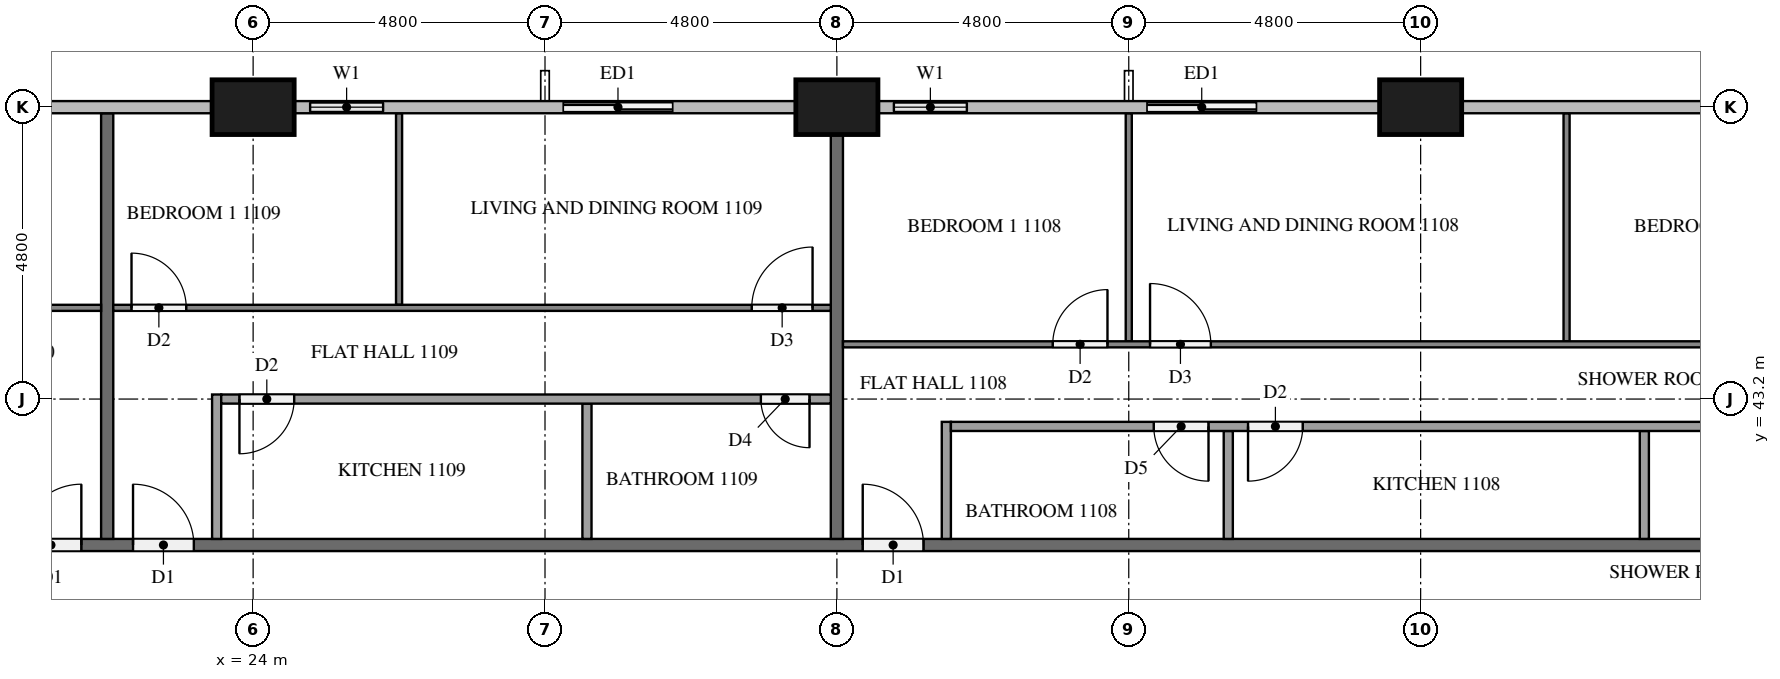
"""IFC4 building model, lengths in metres.
Left out: names, types, materials, properties, quantities, classifications, styles, units other than length and angle.
Written with IfcOpenShell. Run it as: python <this file> out.ifc"""

import sys

from ifc_helpers import new_model, si_unit, direction, frame, frame_2d, origin, origin_2d, place, context, subcontext, project, spatial, rectangle, extrude, element, fill, save


model = new_model("IFC4")
c1 = context("Model", 3, precision=1e-05, world=origin(), true_north=direction((0.0, 1.0)))
c2 = subcontext(c1, "Body", "Model", "MODEL_VIEW")
j1 = project(units=[si_unit("LENGTHUNIT", "METRE"), si_unit("PLANEANGLEUNIT", "RADIAN")], contexts=[c1])
p1 = place(None, origin())
s1 = spatial("IfcSite", under=j1, at=p1, CompositionType="ELEMENT")
p2 = place(p1, origin())
s2 = spatial("IfcBuilding", under=s1, at=p2, CompositionType="ELEMENT")
p3 = place(p2, frame((0.0, 0.0, 46.9)))
s3 = spatial("IfcBuildingStorey", under=s2, at=p3, CompositionType="ELEMENT", Elevation=46.9)
for number, where, z_axis, x_axis in (
    (1, (43.2, 48.0, 0.0), (0.0, 0.0, 1.0), (1.0, 0.0, 0.0)),
    (2, (33.6, 48.0, 0.0), (0.0, 0.0, 1.0), (1.0, 0.0, 0.0)),
    (3, (24.0, 48.0, 0.0), (0.0, 0.0, 1.0), (1.0, 0.0, 0.0)),
):
    element("IfcColumn", number, at=place(p3, frame(where, z_axis=z_axis, x_axis=x_axis)), inside=s3, PredefinedType="COLUMN", context=c2, shape_type="SweptSolid", body=[
        extrude(rectangle(XDim=1.35, YDim=0.9, at=origin_2d()), origin(), (0.0, 0.0, 1.0), 3.2),
    ])
p4 = place(p3, frame((40.8, 48.0, 0.0), z_axis=(0.0, 0.0, 1.0), x_axis=(-1.0, 0.0, 0.0)))
e4 = element("IfcWall", 4, at=p4, inside=s3, PredefinedType="SOLIDWALL", context=c2, shape_type="SweptSolid", body=[
    extrude(rectangle(XDim=2.4, YDim=0.15, at=frame_2d((1.2, 0.0))), origin(), (0.0, 0.0, 1.0), 3.2),
])
p5 = place(p4, frame((0.3, 0.0, 0.0)))
e5 = element("IfcOpeningElement", 5, at=p5, cuts=e4, PredefinedType="OPENING", context=c2, shape_type="SweptSolid", body=[
    extrude(rectangle(XDim=1.8, YDim=2.4, at=frame_2d((0.9, 1.2))), frame((0.0, 0.085, 0.0), z_axis=(0.0, -1.0, 0.0), x_axis=(1.0, 0.0, 0.0)), (0.0, 0.0, 1.0), 0.17),
])
p6 = place(p3, frame((36.0, 48.0, 0.0), z_axis=(0.0, 0.0, 1.0), x_axis=(-1.0, 0.0, 0.0)))
e6 = element("IfcWall", 6, at=p6, inside=s3, PredefinedType="SOLIDWALL", context=c2, shape_type="SweptSolid", body=[
    extrude(rectangle(XDim=1.725, YDim=0.15, at=frame_2d((0.863, 0.0))), origin(), (0.0, 0.0, 1.0), 3.2),
])
p7 = place(p6, frame((0.262, 0.0, 0.9)))
e7 = element("IfcOpeningElement", 7, at=p7, cuts=e6, PredefinedType="OPENING", context=c2, shape_type="SweptSolid", body=[
    extrude(rectangle(XDim=1.2, YDim=1.4, at=frame_2d((0.6, 0.7))), frame((0.0, 0.085, 0.0), z_axis=(0.0, -1.0, 0.0), x_axis=(1.0, 0.0, 0.0)), (0.0, 0.0, 1.0), 0.17),
])
p8 = place(p3, frame((31.2, 48.0, 0.0), z_axis=(0.0, 0.0, 1.0), x_axis=(-1.0, 0.0, 0.0)))
e8 = element("IfcWall", 8, at=p8, inside=s3, PredefinedType="SOLIDWALL", context=c2, shape_type="SweptSolid", body=[
    extrude(rectangle(XDim=2.4, YDim=0.15, at=frame_2d((1.2, 0.0))), origin(), (0.0, 0.0, 1.0), 3.2),
])
p9 = place(p8, frame((0.3, 0.0, 0.0)))
e9 = element("IfcOpeningElement", 9, at=p9, cuts=e8, PredefinedType="OPENING", context=c2, shape_type="SweptSolid", body=[
    extrude(rectangle(XDim=1.8, YDim=2.4, at=frame_2d((0.9, 1.2))), frame((0.0, 0.085, 0.0), z_axis=(0.0, -1.0, 0.0), x_axis=(1.0, 0.0, 0.0)), (0.0, 0.0, 1.0), 0.17),
])
p10 = place(p3, frame((26.4, 48.0, 0.0), z_axis=(0.0, 0.0, 1.0), x_axis=(-1.0, 0.0, 0.0)))
e10 = element("IfcWall", 10, at=p10, inside=s3, PredefinedType="SOLIDWALL", context=c2, shape_type="SweptSolid", body=[
    extrude(rectangle(XDim=1.725, YDim=0.15, at=frame_2d((0.862, 0.0))), origin(), (0.0, 0.0, 1.0), 3.2),
])
p11 = place(p10, frame((0.262, 0.0, 0.9)))
e11 = element("IfcOpeningElement", 11, at=p11, cuts=e10, PredefinedType="OPENING", context=c2, shape_type="SweptSolid", body=[
    extrude(rectangle(XDim=1.2, YDim=1.4, at=frame_2d((0.6, 0.7))), frame((0.0, 0.085, 0.0), z_axis=(0.0, -1.0, 0.0), x_axis=(1.0, 0.0, 0.0)), (0.0, 0.0, 1.0), 0.17),
])
p12 = place(p3, frame((11.9, 40.8, 0.0), z_axis=(0.0, 0.0, 1.0), x_axis=(1.0, 0.0, 0.0)))
e12 = element("IfcWall", 12, at=p12, inside=s3, PredefinedType="PARTITIONING", context=c2, shape_type="SweptSolid", body=[
    extrude(rectangle(XDim=38.6, YDim=0.2, at=frame_2d((19.3, 0.0))), origin(), (0.0, 0.0, 1.0), 3.2),
])
p13 = place(p12, frame((22.125, 0.0, 0.0)))
e13 = element("IfcOpeningElement", 13, at=p13, cuts=e12, PredefinedType="OPENING", context=c2, shape_type="SweptSolid", body=[
    extrude(rectangle(XDim=1.0, YDim=2.1, at=frame_2d((0.5, 1.05))), frame((0.0, 0.11, 0.0), z_axis=(0.0, -1.0, 0.0), x_axis=(1.0, 0.0, 0.0)), (0.0, 0.0, 1.0), 0.22),
])
p14 = place(p12, frame((10.125, 0.0, 0.0)))
e14 = element("IfcOpeningElement", 14, at=p14, cuts=e12, PredefinedType="OPENING", context=c2, shape_type="SweptSolid", body=[
    extrude(rectangle(XDim=1.0, YDim=2.1, at=frame_2d((0.5, 1.05))), frame((0.0, 0.11, 0.0), z_axis=(0.0, -1.0, 0.0), x_axis=(1.0, 0.0, 0.0)), (0.0, 0.0, 1.0), 0.22),
])
p15 = place(p12, frame((8.275, 0.0, 0.0)))
e15 = element("IfcOpeningElement", 15, at=p15, cuts=e12, PredefinedType="OPENING", context=c2, shape_type="SweptSolid", body=[
    extrude(rectangle(XDim=1.0, YDim=2.1, at=frame_2d((0.5, 1.05))), frame((0.0, 0.11, 0.0), z_axis=(0.0, -1.0, 0.0), x_axis=(1.0, 0.0, 0.0)), (0.0, 0.0, 1.0), 0.22),
])
p16 = place(p3, frame((33.6, 47.55, 0.0), z_axis=(0.0, 0.0, 1.0), x_axis=(0.0, -1.0, 0.0)))
e16 = element("IfcWall", 16, at=p16, inside=s3, PredefinedType="PARTITIONING", context=c2, shape_type="SweptSolid", body=[
    extrude(rectangle(XDim=6.65, YDim=0.2, at=frame_2d((3.325, 0.0))), origin(), (0.0, 0.0, 1.0), 3.2),
])
p17 = place(p3, frame((21.6, 47.9, 0.0), z_axis=(0.0, 0.0, 1.0), x_axis=(0.0, -1.0, 0.0)))
e17 = element("IfcWall", 17, at=p17, inside=s3, PredefinedType="PARTITIONING", context=c2, shape_type="SweptSolid", body=[
    extrude(rectangle(XDim=7.0, YDim=0.2, at=frame_2d((3.5, 0.0))), origin(), (0.0, 0.0, 1.0), 3.2),
])
for number, where, z_axis, x_axis in (
    (18, (38.4, 44.15, 0.0), (0.0, 0.0, 1.0), (0.0, 1.0, 0.0)),
    (19, (45.6, 44.15, 0.0), (0.0, 0.0, 1.0), (0.0, 1.0, 0.0)),
):
    element("IfcWall", number, at=place(p3, frame(where, z_axis=z_axis, x_axis=x_axis)), inside=s3, PredefinedType="PARTITIONING", context=c2, shape_type="SweptSolid", body=[
        extrude(rectangle(XDim=3.75, YDim=0.1, at=frame_2d((1.875, 0.0))), origin(), (0.0, 0.0, 1.0), 3.2),
    ])
p18 = place(p3, frame((33.7, 44.1, 0.0), z_axis=(0.0, 0.0, 1.0), x_axis=(1.0, 0.0, 0.0)))
e20 = element("IfcWall", 20, at=p18, inside=s3, PredefinedType="PARTITIONING", context=c2, shape_type="SweptSolid", body=[
    extrude(rectangle(XDim=16.6, YDim=0.1, at=frame_2d((8.3, 0.0))), origin(), (0.0, 0.0, 1.0), 3.2),
])
p19 = place(p18, frame((3.45, 0.0, 0.0)))
e21 = element("IfcOpeningElement", 21, at=p19, cuts=e20, PredefinedType="OPENING", context=c2, shape_type="SweptSolid", body=[
    extrude(rectangle(XDim=0.9, YDim=2.1, at=frame_2d((0.45, 1.05))), frame((0.0, 0.06, 0.0), z_axis=(0.0, -1.0, 0.0), x_axis=(1.0, 0.0, 0.0)), (0.0, 0.0, 1.0), 0.12),
])
p20 = place(p18, frame((5.05, 0.0, 0.0)))
e22 = element("IfcOpeningElement", 22, at=p20, cuts=e20, PredefinedType="OPENING", context=c2, shape_type="SweptSolid", body=[
    extrude(rectangle(XDim=1.0, YDim=2.1, at=frame_2d((0.5, 1.05))), frame((0.0, 0.06, 0.0), z_axis=(0.0, -1.0, 0.0), x_axis=(1.0, 0.0, 0.0)), (0.0, 0.0, 1.0), 0.12),
])
p21 = place(p18, frame((15.4, 0.0, 0.0)))
e23 = element("IfcOpeningElement", 23, at=p21, cuts=e20, PredefinedType="OPENING", context=c2, shape_type="SweptSolid", body=[
    extrude(rectangle(XDim=0.9, YDim=2.1, at=frame_2d((0.45, 1.05))), frame((0.0, 0.06, 0.0), z_axis=(0.0, -1.0, 0.0), x_axis=(1.0, 0.0, 0.0)), (0.0, 0.0, 1.0), 0.12),
])
for number, where, z_axis, x_axis in (
    (24, (40.037, 40.9, 0.0), (0.0, 0.0, 1.0), (0.0, 1.0, 0.0)),
    (25, (46.879, 40.9, 0.0), (0.0, 0.0, 1.0), (0.0, 1.0, 0.0)),
):
    element("IfcWall", number, at=place(p3, frame(where, z_axis=z_axis, x_axis=x_axis)), inside=s3, PredefinedType="PARTITIONING", context=c2, shape_type="SweptSolid", body=[
        extrude(rectangle(XDim=1.775, YDim=0.15, at=frame_2d((0.888, 0.0))), origin(), (0.0, 0.0, 1.0), 3.2),
    ])
p22 = place(p3, frame((35.4, 40.9, 0.0), z_axis=(0.0, 0.0, 1.0), x_axis=(0.0, 1.0, 0.0)))
e26 = element("IfcWall", 26, at=p22, inside=s3, PredefinedType="PARTITIONING", context=c2, shape_type="SweptSolid", body=[
    extrude(rectangle(XDim=1.925, YDim=0.15, at=frame_2d((0.962, 0.0))), origin(), (0.0, 0.0, 1.0), 3.2),
])
p23 = place(p3, frame((50.3, 42.75, 0.0), z_axis=(0.0, 0.0, 1.0), x_axis=(-1.0, 0.0, 0.0)))
e27 = element("IfcWall", 27, at=p23, inside=s3, PredefinedType="PARTITIONING", context=c2, shape_type="SweptSolid", body=[
    extrude(rectangle(XDim=14.825, YDim=0.15, at=frame_2d((7.413, 0.0))), origin(), (0.0, 0.0, 1.0), 3.2),
])
p24 = place(p23, frame((10.588, 0.0, 0.0)))
e28 = element("IfcOpeningElement", 28, at=p24, cuts=e27, PredefinedType="OPENING", context=c2, shape_type="SweptSolid", body=[
    extrude(rectangle(XDim=0.9, YDim=2.1, at=frame_2d((0.45, 1.05))), frame((0.0, 0.085, 0.0), z_axis=(0.0, -1.0, 0.0), x_axis=(1.0, 0.0, 0.0)), (0.0, 0.0, 1.0), 0.17),
])
p25 = place(p23, frame((9.039, 0.0, 0.0)))
e29 = element("IfcOpeningElement", 29, at=p25, cuts=e27, PredefinedType="OPENING", context=c2, shape_type="SweptSolid", body=[
    extrude(rectangle(XDim=0.9, YDim=2.1, at=frame_2d((0.45, 1.05))), frame((0.0, 0.085, 0.0), z_axis=(0.0, -1.0, 0.0), x_axis=(1.0, 0.0, 0.0)), (0.0, 0.0, 1.0), 0.17),
])
p26 = place(p23, frame((0.35, 0.0, 0.0)))
e30 = element("IfcOpeningElement", 30, at=p26, cuts=e27, PredefinedType="OPENING", context=c2, shape_type="SweptSolid", body=[
    extrude(rectangle(XDim=0.8, YDim=2.1, at=frame_2d((0.4, 1.05))), frame((0.0, 0.085, 0.0), z_axis=(0.0, -1.0, 0.0), x_axis=(1.0, 0.0, 0.0)), (0.0, 0.0, 1.0), 0.17),
])
p27 = place(p3, frame((26.4, 44.75, 0.0), z_axis=(0.0, 0.0, 1.0), x_axis=(0.0, 1.0, 0.0)))
e31 = element("IfcWall", 31, at=p27, inside=s3, PredefinedType="PARTITIONING", context=c2, shape_type="SweptSolid", body=[
    extrude(rectangle(XDim=3.15, YDim=0.1, at=frame_2d((1.575, 0.0))), origin(), (0.0, 0.0, 1.0), 3.2),
])
p28 = place(p3, frame((21.7, 44.7, 0.0), z_axis=(0.0, 0.0, 1.0), x_axis=(1.0, 0.0, 0.0)))
e32 = element("IfcWall", 32, at=p28, inside=s3, PredefinedType="PARTITIONING", context=c2, shape_type="SweptSolid", body=[
    extrude(rectangle(XDim=11.8, YDim=0.1, at=frame_2d((5.9, 0.0))), origin(), (0.0, 0.0, 1.0), 3.2),
])
p29 = place(p28, frame((0.3, 0.0, 0.0)))
e33 = element("IfcOpeningElement", 33, at=p29, cuts=e32, PredefinedType="OPENING", context=c2, shape_type="SweptSolid", body=[
    extrude(rectangle(XDim=0.9, YDim=2.1, at=frame_2d((0.45, 1.05))), frame((0.0, 0.06, 0.0), z_axis=(0.0, -1.0, 0.0), x_axis=(1.0, 0.0, 0.0)), (0.0, 0.0, 1.0), 0.12),
])
p30 = place(p28, frame((10.5, 0.0, 0.0)))
e34 = element("IfcOpeningElement", 34, at=p30, cuts=e32, PredefinedType="OPENING", context=c2, shape_type="SweptSolid", body=[
    extrude(rectangle(XDim=1.0, YDim=2.1, at=frame_2d((0.5, 1.05))), frame((0.0, 0.06, 0.0), z_axis=(0.0, -1.0, 0.0), x_axis=(1.0, 0.0, 0.0)), (0.0, 0.0, 1.0), 0.12),
])
p31 = place(p3, frame((29.49, 40.9, 0.0), z_axis=(0.0, 0.0, 1.0), x_axis=(0.0, 1.0, 0.0)))
e35 = element("IfcWall", 35, at=p31, inside=s3, PredefinedType="PARTITIONING", context=c2, shape_type="SweptSolid", body=[
    extrude(rectangle(XDim=2.225, YDim=0.15, at=frame_2d((1.113, 0.0))), origin(), (0.0, 0.0, 1.0), 3.2),
])
p32 = place(p3, frame((23.4, 40.9, 0.0), z_axis=(0.0, 0.0, 1.0), x_axis=(0.0, 1.0, 0.0)))
e36 = element("IfcWall", 36, at=p32, inside=s3, PredefinedType="PARTITIONING", context=c2, shape_type="SweptSolid", body=[
    extrude(rectangle(XDim=2.375, YDim=0.15, at=frame_2d((1.188, 0.0))), origin(), (0.0, 0.0, 1.0), 3.2),
])
p33 = place(p3, frame((33.5, 43.2, 0.0), z_axis=(0.0, 0.0, 1.0), x_axis=(-1.0, 0.0, 0.0)))
e37 = element("IfcWall", 37, at=p33, inside=s3, PredefinedType="PARTITIONING", context=c2, shape_type="SweptSolid", body=[
    extrude(rectangle(XDim=10.025, YDim=0.15, at=frame_2d((5.012, 0.0))), origin(), (0.0, 0.0, 1.0), 3.2),
])
p34 = place(p33, frame((8.825, 0.0, 0.0)))
e38 = element("IfcOpeningElement", 38, at=p34, cuts=e37, PredefinedType="OPENING", context=c2, shape_type="SweptSolid", body=[
    extrude(rectangle(XDim=0.9, YDim=2.1, at=frame_2d((0.45, 1.05))), frame((0.0, 0.085, 0.0), z_axis=(0.0, -1.0, 0.0), x_axis=(1.0, 0.0, 0.0)), (0.0, 0.0, 1.0), 0.17),
])
p35 = place(p33, frame((0.35, 0.0, 0.0)))
e39 = element("IfcOpeningElement", 39, at=p35, cuts=e37, PredefinedType="OPENING", context=c2, shape_type="SweptSolid", body=[
    extrude(rectangle(XDim=0.8, YDim=2.1, at=frame_2d((0.4, 1.05))), frame((0.0, 0.085, 0.0), z_axis=(0.0, -1.0, 0.0), x_axis=(1.0, 0.0, 0.0)), (0.0, 0.0, 1.0), 0.17),
])
p36 = place(p3, frame((12.1, 44.7, 0.0), z_axis=(0.0, 0.0, 1.0), x_axis=(1.0, 0.0, 0.0)))
e40 = element("IfcWall", 40, at=p36, inside=s3, PredefinedType="PARTITIONING", context=c2, shape_type="SweptSolid", body=[
    extrude(rectangle(XDim=9.4, YDim=0.1, at=frame_2d((4.7, 0.0))), origin(), (0.0, 0.0, 1.0), 3.2),
])
p37 = place(p36, frame((5.05, 0.0, 0.0)))
e41 = element("IfcOpeningElement", 41, at=p37, cuts=e40, PredefinedType="OPENING", context=c2, shape_type="SweptSolid", body=[
    extrude(rectangle(XDim=0.9, YDim=2.1, at=frame_2d((0.45, 1.05))), frame((0.0, 0.06, 0.0), z_axis=(0.0, -1.0, 0.0), x_axis=(1.0, 0.0, 0.0)), (0.0, 0.0, 1.0), 0.12),
])
p38 = place(p36, frame((3.35, 0.0, 0.0)))
e42 = element("IfcOpeningElement", 42, at=p38, cuts=e40, PredefinedType="OPENING", context=c2, shape_type="SweptSolid", body=[
    extrude(rectangle(XDim=1.0, YDim=2.1, at=frame_2d((0.5, 1.05))), frame((0.0, 0.06, 0.0), z_axis=(0.0, -1.0, 0.0), x_axis=(1.0, 0.0, 0.0)), (0.0, 0.0, 1.0), 0.12),
])
p39 = place(p5, origin())
e43 = element("IfcDoor", 43, at=p39, inside=s3, OperationType="SLIDING_TO_RIGHT", PredefinedType="DOOR", context=c2, shape_type="SweptSolid", body=[
    extrude(rectangle(XDim=1.8, YDim=2.4, at=frame_2d((0.9, 1.2))), frame((0.0, 0.025, 0.0), z_axis=(0.0, -1.0, 0.0), x_axis=(1.0, 0.0, 0.0)), (0.0, 0.0, 1.0), 0.05),
])
fill(e5, e43)
p40 = place(p7, origin())
e44 = element("IfcWindow", 44, at=p40, inside=s3, PartitioningType="SINGLE_PANEL", PredefinedType="WINDOW", context=c2, shape_type="SweptSolid", body=[
    extrude(rectangle(XDim=1.2, YDim=1.4, at=frame_2d((0.6, 0.7))), frame((0.0, 0.03, 0.0), z_axis=(0.0, -1.0, 0.0), x_axis=(1.0, 0.0, 0.0)), (0.0, 0.0, 1.0), 0.06),
])
fill(e7, e44)
p41 = place(p9, origin())
e45 = element("IfcDoor", 45, at=p41, inside=s3, OperationType="SLIDING_TO_LEFT", PredefinedType="DOOR", context=c2, shape_type="SweptSolid", body=[
    extrude(rectangle(XDim=1.8, YDim=2.4, at=frame_2d((0.9, 1.2))), frame((0.0, 0.025, 0.0), z_axis=(0.0, -1.0, 0.0), x_axis=(1.0, 0.0, 0.0)), (0.0, 0.0, 1.0), 0.05),
])
fill(e9, e45)
p42 = place(p11, origin())
e46 = element("IfcWindow", 46, at=p42, inside=s3, PartitioningType="SINGLE_PANEL", PredefinedType="WINDOW", context=c2, shape_type="SweptSolid", body=[
    extrude(rectangle(XDim=1.2, YDim=1.4, at=frame_2d((0.6, 0.7))), frame((0.0, 0.03, 0.0), z_axis=(0.0, -1.0, 0.0), x_axis=(1.0, 0.0, 0.0)), (0.0, 0.0, 1.0), 0.06),
])
fill(e11, e46)
p43 = place(p13, origin())
e47 = element("IfcDoor", 47, at=p43, inside=s3, OperationType="SINGLE_SWING_LEFT", PredefinedType="DOOR", context=c2, shape_type="SweptSolid", body=[
    extrude(rectangle(XDim=1.0, YDim=2.1, at=frame_2d((0.5, 1.05))), frame((0.0, 0.025, 0.0), z_axis=(0.0, -1.0, 0.0), x_axis=(1.0, 0.0, 0.0)), (0.0, 0.0, 1.0), 0.05),
])
fill(e13, e47)
p44 = place(p14, origin())
e48 = element("IfcDoor", 48, at=p44, inside=s3, OperationType="SINGLE_SWING_LEFT", PredefinedType="DOOR", context=c2, shape_type="SweptSolid", body=[
    extrude(rectangle(XDim=1.0, YDim=2.1, at=frame_2d((0.5, 1.05))), frame((0.0, 0.025, 0.0), z_axis=(0.0, -1.0, 0.0), x_axis=(1.0, 0.0, 0.0)), (0.0, 0.0, 1.0), 0.05),
])
fill(e14, e48)
p45 = place(p15, origin())
e49 = element("IfcDoor", 49, at=p45, inside=s3, OperationType="SINGLE_SWING_RIGHT", PredefinedType="DOOR", context=c2, shape_type="SweptSolid", body=[
    extrude(rectangle(XDim=1.0, YDim=2.1, at=frame_2d((0.5, 1.05))), frame((0.0, 0.025, 0.0), z_axis=(0.0, -1.0, 0.0), x_axis=(1.0, 0.0, 0.0)), (0.0, 0.0, 1.0), 0.05),
])
fill(e15, e49)
p46 = place(p19, origin())
e50 = element("IfcDoor", 50, at=p46, inside=s3, OperationType="SINGLE_SWING_RIGHT", PredefinedType="DOOR", context=c2, shape_type="SweptSolid", body=[
    extrude(rectangle(XDim=0.9, YDim=2.1, at=frame_2d((0.45, 1.05))), frame((0.0, 0.025, 0.0), z_axis=(0.0, -1.0, 0.0), x_axis=(1.0, 0.0, 0.0)), (0.0, 0.0, 1.0), 0.05),
])
fill(e21, e50)
p47 = place(p20, origin())
e51 = element("IfcDoor", 51, at=p47, inside=s3, OperationType="SINGLE_SWING_LEFT", PredefinedType="DOOR", context=c2, shape_type="SweptSolid", body=[
    extrude(rectangle(XDim=1.0, YDim=2.1, at=frame_2d((0.5, 1.05))), frame((0.0, 0.025, 0.0), z_axis=(0.0, -1.0, 0.0), x_axis=(1.0, 0.0, 0.0)), (0.0, 0.0, 1.0), 0.05),
])
fill(e22, e51)
p48 = place(p24, origin())
e52 = element("IfcDoor", 52, at=p48, inside=s3, OperationType="SINGLE_SWING_LEFT", PredefinedType="DOOR", context=c2, shape_type="SweptSolid", body=[
    extrude(rectangle(XDim=0.9, YDim=2.1, at=frame_2d((0.45, 1.05))), frame((0.0, 0.025, 0.0), z_axis=(0.0, -1.0, 0.0), x_axis=(1.0, 0.0, 0.0)), (0.0, 0.0, 1.0), 0.05),
])
fill(e28, e52)
p49 = place(p25, origin())
e53 = element("IfcDoor", 53, at=p49, inside=s3, OperationType="SINGLE_SWING_RIGHT", PredefinedType="DOOR", context=c2, shape_type="SweptSolid", body=[
    extrude(rectangle(XDim=0.9, YDim=2.1, at=frame_2d((0.45, 1.05))), frame((0.0, 0.025, 0.0), z_axis=(0.0, -1.0, 0.0), x_axis=(1.0, 0.0, 0.0)), (0.0, 0.0, 1.0), 0.05),
])
fill(e29, e53)
p50 = place(p29, origin())
e54 = element("IfcDoor", 54, at=p50, inside=s3, OperationType="SINGLE_SWING_LEFT", PredefinedType="DOOR", context=c2, shape_type="SweptSolid", body=[
    extrude(rectangle(XDim=0.9, YDim=2.1, at=frame_2d((0.45, 1.05))), frame((0.0, 0.025, 0.0), z_axis=(0.0, -1.0, 0.0), x_axis=(1.0, 0.0, 0.0)), (0.0, 0.0, 1.0), 0.05),
])
fill(e33, e54)
p51 = place(p30, origin())
e55 = element("IfcDoor", 55, at=p51, inside=s3, OperationType="SINGLE_SWING_RIGHT", PredefinedType="DOOR", context=c2, shape_type="SweptSolid", body=[
    extrude(rectangle(XDim=1.0, YDim=2.1, at=frame_2d((0.5, 1.05))), frame((0.0, 0.025, 0.0), z_axis=(0.0, -1.0, 0.0), x_axis=(1.0, 0.0, 0.0)), (0.0, 0.0, 1.0), 0.05),
])
fill(e34, e55)
p52 = place(p34, origin())
e56 = element("IfcDoor", 56, at=p52, inside=s3, OperationType="SINGLE_SWING_RIGHT", PredefinedType="DOOR", context=c2, shape_type="SweptSolid", body=[
    extrude(rectangle(XDim=0.9, YDim=2.1, at=frame_2d((0.45, 1.05))), frame((0.0, 0.025, 0.0), z_axis=(0.0, -1.0, 0.0), x_axis=(1.0, 0.0, 0.0)), (0.0, 0.0, 1.0), 0.05),
])
fill(e38, e56)
p53 = place(p35, origin())
e57 = element("IfcDoor", 57, at=p53, inside=s3, OperationType="SINGLE_SWING_LEFT", PredefinedType="DOOR", context=c2, shape_type="SweptSolid", body=[
    extrude(rectangle(XDim=0.8, YDim=2.1, at=frame_2d((0.4, 1.05))), frame((0.0, 0.025, 0.0), z_axis=(0.0, -1.0, 0.0), x_axis=(1.0, 0.0, 0.0)), (0.0, 0.0, 1.0), 0.05),
])
fill(e39, e57)
save(model, sys.argv[1])
